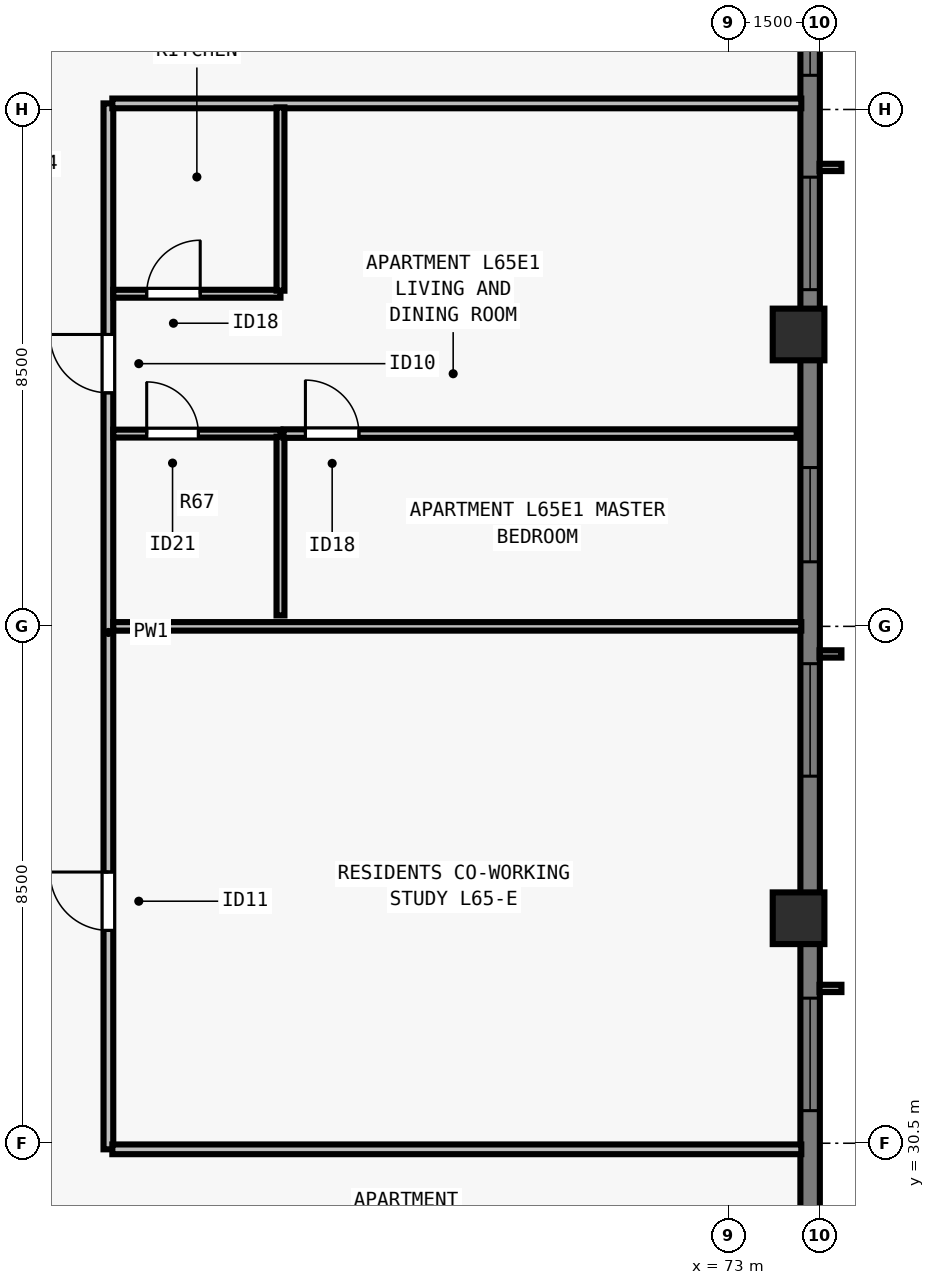
"""IFC4 building model, lengths in metres.
Left out: names, types, materials, properties, quantities, classifications, styles, units other than length and angle.
Written with IfcOpenShell. Run it as: python <this file> out.ifc"""

import sys

from ifc_helpers import new_model, si_unit, direction, frame, frame_2d, origin, origin_2d, place, context, subcontext, project, spatial, rectangle, extrude, element, fill, save


model = new_model("IFC4")
c1 = context("Model", 3, precision=1e-05, world=origin(), true_north=direction((0.0, 1.0)))
c2 = subcontext(c1, "Body", "Model", "MODEL_VIEW")
j1 = project(units=[si_unit("LENGTHUNIT", "METRE"), si_unit("PLANEANGLEUNIT", "RADIAN")], contexts=[c1])
p1 = place(None, origin())
s1 = spatial("IfcSite", under=j1, at=p1, CompositionType="ELEMENT")
p2 = place(p1, origin())
s2 = spatial("IfcBuilding", under=s1, at=p2, CompositionType="ELEMENT")
p3 = place(p2, frame((0.0, 0.0, 237.5)))
s3 = spatial("IfcBuildingStorey", under=s2, at=p3, CompositionType="ELEMENT", Elevation=237.5)
for number, where, z_axis, x_axis in (
    (1, (74.15, 34.2, 0.0), (0.0, 0.0, 1.0), (0.0, 1.0, 0.0)),
    (2, (74.15, 43.8, 0.0), (0.0, 0.0, 1.0), (0.0, 1.0, 0.0)),
):
    element("IfcColumn", number, at=place(p3, frame(where, z_axis=z_axis, x_axis=x_axis)), inside=s3, PredefinedType="COLUMN", context=c2, shape_type="SweptSolid", body=[
        extrude(rectangle(XDim=0.85, YDim=0.85, at=origin_2d()), origin(), (0.0, 0.0, 1.0), 3.5),
    ])
p4 = place(p3, frame((74.34, 56.5, 0.0), z_axis=(0.0, 0.0, 1.0), x_axis=(0.0, -1.0, 0.0)))
e3 = element("IfcWall", 3, at=p4, inside=s3, PredefinedType="SOLIDWALL", context=c2, shape_type="SweptSolid", body=[
    extrude(rectangle(XDim=34.702, YDim=0.32, at=frame_2d((17.351, 0.0))), origin(), (0.0, 0.0, 1.0), 3.29),
])
p5 = place(p4, frame((6.888, 0.0, 0.8)))
e4 = element("IfcOpeningElement", 4, at=p5, cuts=e3, PredefinedType="OPENING", context=c2, shape_type="SweptSolid", body=[
    extrude(rectangle(XDim=1.55, YDim=1.678, at=frame_2d((0.775, 0.839))), frame((0.0, 0.17, 0.0), z_axis=(0.0, -1.0, 0.0), x_axis=(1.0, 0.0, 0.0)), (0.0, 0.0, 1.0), 0.34),
])
p6 = place(p4, frame((10.113, 0.0, 0.8)))
e5 = element("IfcOpeningElement", 5, at=p6, cuts=e3, PredefinedType="OPENING", context=c2, shape_type="SweptSolid", body=[
    extrude(rectangle(XDim=1.85, YDim=1.678, at=frame_2d((0.925, 0.839))), frame((0.0, 0.17, 0.0), z_axis=(0.0, -1.0, 0.0), x_axis=(1.0, 0.0, 0.0)), (0.0, 0.0, 1.0), 0.34),
])
p7 = place(p4, frame((14.888, 0.0, 0.8)))
e6 = element("IfcOpeningElement", 6, at=p7, cuts=e3, PredefinedType="OPENING", context=c2, shape_type="SweptSolid", body=[
    extrude(rectangle(XDim=1.55, YDim=1.678, at=frame_2d((0.775, 0.839))), frame((0.0, 0.17, 0.0), z_axis=(0.0, -1.0, 0.0), x_axis=(1.0, 0.0, 0.0)), (0.0, 0.0, 1.0), 0.34),
])
p8 = place(p4, frame((18.114, 0.0, 0.8)))
e7 = element("IfcOpeningElement", 7, at=p8, cuts=e3, PredefinedType="OPENING", context=c2, shape_type="SweptSolid", body=[
    extrude(rectangle(XDim=1.85, YDim=1.678, at=frame_2d((0.925, 0.839))), frame((0.0, 0.17, 0.0), z_axis=(0.0, -1.0, 0.0), x_axis=(1.0, 0.0, 0.0)), (0.0, 0.0, 1.0), 0.34),
])
p9 = place(p4, frame((23.614, 0.0, 0.8)))
e8 = element("IfcOpeningElement", 8, at=p9, cuts=e3, PredefinedType="OPENING", context=c2, shape_type="SweptSolid", body=[
    extrude(rectangle(XDim=1.85, YDim=1.678, at=frame_2d((0.925, 0.839))), frame((0.0, 0.17, 0.0), z_axis=(0.0, -1.0, 0.0), x_axis=(1.0, 0.0, 0.0)), (0.0, 0.0, 1.0), 0.34),
])
p10 = place(p4, frame((27.139, 0.0, 0.8)))
e9 = element("IfcOpeningElement", 9, at=p10, cuts=e3, PredefinedType="OPENING", context=c2, shape_type="SweptSolid", body=[
    extrude(rectangle(XDim=1.55, YDim=1.678, at=frame_2d((0.775, 0.839))), frame((0.0, 0.17, 0.0), z_axis=(0.0, -1.0, 0.0), x_axis=(1.0, 0.0, 0.0)), (0.0, 0.0, 1.0), 0.34),
])
p11 = place(p3, frame((62.8, 30.4, 0.0), z_axis=(0.0, 0.0, 1.0), x_axis=(0.0, 1.0, 0.0)))
e10 = element("IfcWall", 10, at=p11, inside=s3, PredefinedType="PARTITIONING", context=c2, shape_type="SweptSolid", body=[
    extrude(rectangle(XDim=17.2, YDim=0.16, at=frame_2d((8.6, 0.0))), origin(), (0.0, 0.0, 1.0), 3.29),
])
p12 = place(p11, frame((3.6, 0.0, 0.0)))
e11 = element("IfcOpeningElement", 11, at=p12, cuts=e10, PredefinedType="OPENING", context=c2, shape_type="SweptSolid", body=[
    extrude(rectangle(XDim=0.96, YDim=2.12, at=frame_2d((0.48, 1.06))), frame((0.0, 0.09, 0.0), z_axis=(0.0, -1.0, 0.0), x_axis=(1.0, 0.0, 0.0)), (0.0, 0.0, 1.0), 0.18),
])
p13 = place(p11, frame((12.44, 0.0, 0.0)))
e12 = element("IfcOpeningElement", 12, at=p13, cuts=e10, PredefinedType="OPENING", context=c2, shape_type="SweptSolid", body=[
    extrude(rectangle(XDim=0.96, YDim=2.18, at=frame_2d((0.48, 1.09))), frame((0.0, 0.09, 0.0), z_axis=(0.0, -1.0, 0.0), x_axis=(1.0, 0.0, 0.0)), (0.0, 0.0, 1.0), 0.18),
])
for number, where, z_axis, x_axis in (
    (13, (62.865, 30.4, 0.0), (0.0, 0.0, 1.0), (1.0, 0.0, 0.0)),
    (14, (62.865, 47.6, 0.0), (0.0, 0.0, 1.0), (1.0, 0.0, 0.0)),
):
    element("IfcWall", number, at=place(p3, frame(where, z_axis=z_axis, x_axis=x_axis)), inside=s3, PredefinedType="PARTITIONING", context=c2, shape_type="SweptSolid", body=[
        extrude(rectangle(XDim=11.33, YDim=0.16, at=frame_2d((5.665, 0.0))), origin(), (0.0, 0.0, 1.0), 3.29),
    ])
p14 = place(p3, frame((62.88, 39.0, 0.0), z_axis=(0.0, 0.0, 1.0), x_axis=(1.0, 0.0, 0.0)))
e15 = element("IfcWall", 15, at=p14, inside=s3, PredefinedType="PARTITIONING", context=c2, shape_type="SweptSolid", body=[
    extrude(rectangle(XDim=11.315, YDim=0.14, at=frame_2d((5.658, 0.0))), origin(), (0.0, 0.0, 1.0), 3.29),
])
p15 = place(p3, frame((62.88, 42.17, 0.0), z_axis=(0.0, 0.0, 1.0), x_axis=(1.0, 0.0, 0.0)))
e16 = element("IfcWall", 16, at=p15, inside=s3, PredefinedType="PLUMBINGWALL", context=c2, shape_type="SweptSolid", body=[
    extrude(rectangle(XDim=2.75, YDim=0.13, at=frame_2d((1.375, 0.0))), origin(), (0.0, 0.0, 1.0), 3.29),
])
p16 = place(p15, frame((0.55, 0.0, 0.0)))
e17 = element("IfcOpeningElement", 17, at=p16, cuts=e16, PredefinedType="OPENING", context=c2, shape_type="SweptSolid", body=[
    extrude(rectangle(XDim=0.85, YDim=2.08, at=frame_2d((0.425, 1.04))), frame((0.0, 0.075, 0.0), z_axis=(0.0, -1.0, 0.0), x_axis=(1.0, 0.0, 0.0)), (0.0, 0.0, 1.0), 0.15),
])
p17 = place(p3, frame((65.63, 39.18, 0.0), z_axis=(0.0, 0.0, 1.0), x_axis=(0.0, 1.0, 0.0)))
e18 = element("IfcWall", 18, at=p17, inside=s3, PredefinedType="PLUMBINGWALL", context=c2, shape_type="SweptSolid", body=[
    extrude(rectangle(XDim=2.94, YDim=0.13, at=frame_2d((1.47, 0.0))), origin(), (0.0, 0.0, 1.0), 3.29),
])
p18 = place(p3, frame((62.88, 44.47, 0.0), z_axis=(0.0, 0.0, 1.0), x_axis=(1.0, 0.0, 0.0)))
e19 = element("IfcWall", 19, at=p18, inside=s3, PredefinedType="PLUMBINGWALL", context=c2, shape_type="SweptSolid", body=[
    extrude(rectangle(XDim=2.75, YDim=0.13, at=frame_2d((1.375, 0.0))), origin(), (0.0, 0.0, 1.0), 3.29),
])
p19 = place(p18, frame((0.55, 0.0, 0.0)))
e20 = element("IfcOpeningElement", 20, at=p19, cuts=e19, PredefinedType="OPENING", context=c2, shape_type="SweptSolid", body=[
    extrude(rectangle(XDim=0.88, YDim=2.1, at=frame_2d((0.44, 1.05))), frame((0.0, 0.075, 0.0), z_axis=(0.0, -1.0, 0.0), x_axis=(1.0, 0.0, 0.0)), (0.0, 0.0, 1.0), 0.15),
])
p20 = place(p3, frame((65.63, 44.52, 0.0), z_axis=(0.0, 0.0, 1.0), x_axis=(0.0, 1.0, 0.0)))
e21 = element("IfcWall", 21, at=p20, inside=s3, PredefinedType="PLUMBINGWALL", context=c2, shape_type="SweptSolid", body=[
    extrude(rectangle(XDim=3.015, YDim=0.13, at=frame_2d((1.507, 0.0))), origin(), (0.0, 0.0, 1.0), 3.29),
])
p21 = place(p3, frame((65.68, 42.17, 0.0), z_axis=(0.0, 0.0, 1.0), x_axis=(1.0, 0.0, 0.0)))
e22 = element("IfcWall", 22, at=p21, inside=s3, PredefinedType="PARTITIONING", context=c2, shape_type="SweptSolid", body=[
    extrude(rectangle(XDim=8.44, YDim=0.14, at=frame_2d((4.22, 0.0))), origin(), (0.0, 0.0, 1.0), 3.29),
])
p22 = place(p21, frame((0.36, 0.0, 0.0)))
e23 = element("IfcOpeningElement", 23, at=p22, cuts=e22, PredefinedType="OPENING", context=c2, shape_type="SweptSolid", body=[
    extrude(rectangle(XDim=0.88, YDim=2.1, at=frame_2d((0.44, 1.05))), frame((0.0, 0.08, 0.0), z_axis=(0.0, -1.0, 0.0), x_axis=(1.0, 0.0, 0.0)), (0.0, 0.0, 1.0), 0.16),
])
p23 = place(p5, origin())
e24 = element("IfcWindow", 24, at=p23, inside=s3, PartitioningType="SINGLE_PANEL", PredefinedType="WINDOW", context=c2, shape_type="SweptSolid", body=[
    extrude(rectangle(XDim=1.55, YDim=1.678, at=frame_2d((0.775, 0.839))), frame((0.0, -0.05, 0.0), z_axis=(0.0, -1.0, 0.0), x_axis=(1.0, 0.0, 0.0)), (0.0, 0.0, 1.0), 0.06),
])
fill(e4, e24)
p24 = place(p6, origin())
e25 = element("IfcWindow", 25, at=p24, inside=s3, PartitioningType="SINGLE_PANEL", PredefinedType="WINDOW", context=c2, shape_type="SweptSolid", body=[
    extrude(rectangle(XDim=1.85, YDim=1.678, at=frame_2d((0.925, 0.839))), frame((0.0, -0.05, 0.0), z_axis=(0.0, -1.0, 0.0), x_axis=(1.0, 0.0, 0.0)), (0.0, 0.0, 1.0), 0.06),
])
fill(e5, e25)
p25 = place(p7, origin())
e26 = element("IfcWindow", 26, at=p25, inside=s3, PartitioningType="SINGLE_PANEL", PredefinedType="WINDOW", context=c2, shape_type="SweptSolid", body=[
    extrude(rectangle(XDim=1.55, YDim=1.678, at=frame_2d((0.775, 0.839))), frame((0.0, -0.05, 0.0), z_axis=(0.0, -1.0, 0.0), x_axis=(1.0, 0.0, 0.0)), (0.0, 0.0, 1.0), 0.06),
])
fill(e6, e26)
p26 = place(p8, origin())
e27 = element("IfcWindow", 27, at=p26, inside=s3, PartitioningType="SINGLE_PANEL", PredefinedType="WINDOW", context=c2, shape_type="SweptSolid", body=[
    extrude(rectangle(XDim=1.85, YDim=1.678, at=frame_2d((0.925, 0.839))), frame((0.0, -0.05, 0.0), z_axis=(0.0, -1.0, 0.0), x_axis=(1.0, 0.0, 0.0)), (0.0, 0.0, 1.0), 0.06),
])
fill(e7, e27)
p27 = place(p9, origin())
e28 = element("IfcWindow", 28, at=p27, inside=s3, PartitioningType="SINGLE_PANEL", PredefinedType="WINDOW", context=c2, shape_type="SweptSolid", body=[
    extrude(rectangle(XDim=1.85, YDim=1.678, at=frame_2d((0.925, 0.839))), frame((0.0, -0.05, 0.0), z_axis=(0.0, -1.0, 0.0), x_axis=(1.0, 0.0, 0.0)), (0.0, 0.0, 1.0), 0.06),
])
fill(e8, e28)
p28 = place(p12, origin())
e29 = element("IfcDoor", 29, at=p28, inside=s3, OperationType="SINGLE_SWING_RIGHT", PredefinedType="DOOR", context=c2, shape_type="SweptSolid", body=[
    extrude(rectangle(XDim=0.96, YDim=2.12, at=frame_2d((0.48, 1.06))), frame((0.0, 0.025, 0.0), z_axis=(0.0, -1.0, 0.0), x_axis=(1.0, 0.0, 0.0)), (0.0, 0.0, 1.0), 0.05),
])
fill(e11, e29)
p29 = place(p16, origin())
e30 = element("IfcDoor", 30, at=p29, inside=s3, OperationType="SINGLE_SWING_LEFT", PredefinedType="DOOR", context=c2, shape_type="SweptSolid", body=[
    extrude(rectangle(XDim=0.85, YDim=2.08, at=frame_2d((0.425, 1.04))), frame((0.0, 0.025, 0.0), z_axis=(0.0, -1.0, 0.0), x_axis=(1.0, 0.0, 0.0)), (0.0, 0.0, 1.0), 0.05),
])
fill(e17, e30)
p30 = place(p19, origin())
e31 = element("IfcDoor", 31, at=p30, inside=s3, OperationType="SINGLE_SWING_RIGHT", PredefinedType="DOOR", context=c2, shape_type="SweptSolid", body=[
    extrude(rectangle(XDim=0.88, YDim=2.1, at=frame_2d((0.44, 1.05))), frame((0.0, 0.025, 0.0), z_axis=(0.0, -1.0, 0.0), x_axis=(1.0, 0.0, 0.0)), (0.0, 0.0, 1.0), 0.05),
])
fill(e20, e31)
p31 = place(p22, origin())
e32 = element("IfcDoor", 32, at=p31, inside=s3, OperationType="SINGLE_SWING_LEFT", PredefinedType="DOOR", context=c2, shape_type="SweptSolid", body=[
    extrude(rectangle(XDim=0.88, YDim=2.1, at=frame_2d((0.44, 1.05))), frame((0.0, 0.025, 0.0), z_axis=(0.0, -1.0, 0.0), x_axis=(1.0, 0.0, 0.0)), (0.0, 0.0, 1.0), 0.05),
])
fill(e23, e32)
p32 = place(p13, origin())
e33 = element("IfcDoor", 33, at=p32, inside=s3, OperationType="SINGLE_SWING_RIGHT", PredefinedType="DOOR", context=c2, shape_type="SweptSolid", body=[
    extrude(rectangle(XDim=0.96, YDim=2.18, at=frame_2d((0.48, 1.09))), frame((0.0, 0.025, 0.0), z_axis=(0.0, -1.0, 0.0), x_axis=(1.0, 0.0, 0.0)), (0.0, 0.0, 1.0), 0.05),
])
fill(e12, e33)
save(model, sys.argv[1])
